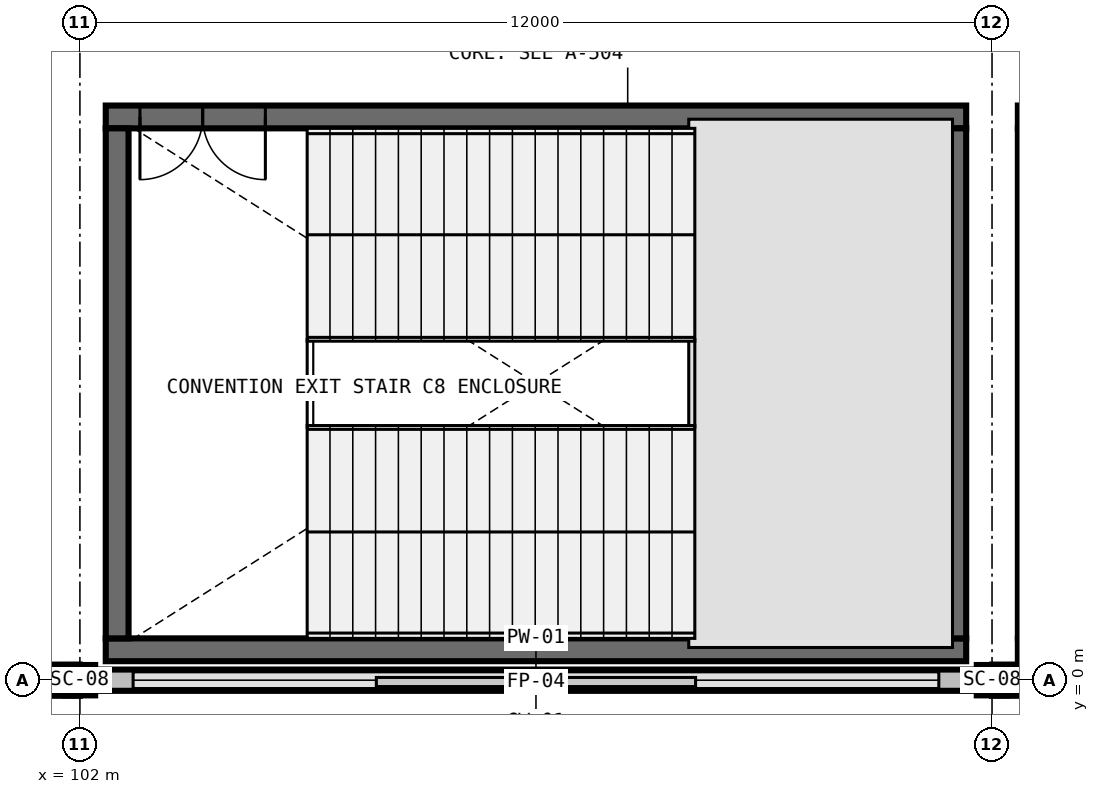
"""IFC4 building model, lengths in metres.
Left out: names, types, materials, properties, quantities, classifications, styles, units other than length and angle.
Written with IfcOpenShell. Run it as: python <this file> out.ifc"""

import sys

from ifc_helpers import new_model, si_unit, direction, frame, frame_2d, origin, origin_2d, place, context, subcontext, project, spatial, rectangle, i_section, extrude, element, fill, save


model = new_model("IFC4")
c1 = context("Model", 3, precision=1e-05, world=origin(), true_north=direction((0.0, 1.0)))
c2 = subcontext(c1, "Body", "Model", "MODEL_VIEW")
j1 = project(units=[si_unit("LENGTHUNIT", "METRE"), si_unit("PLANEANGLEUNIT", "RADIAN")], contexts=[c1])
p1 = place(None, origin())
s1 = spatial("IfcSite", under=j1, at=p1, CompositionType="ELEMENT")
p2 = place(p1, origin())
s2 = spatial("IfcBuilding", under=s1, at=p2, CompositionType="ELEMENT")
p3 = place(p2, frame((0.0, 0.0, 6.0)))
s3 = spatial("IfcBuildingStorey", under=s2, at=p3, CompositionType="ELEMENT", Elevation=6.0)
for number, where, z_axis, x_axis in (
    (1, (102.0, 0.0, 0.0), (0.0, 0.0, 1.0), (1.0, 0.0, 0.0)),
    (2, (114.0, 0.0, 0.0), (0.0, 0.0, 1.0), (1.0, 0.0, 0.0)),
):
    element("IfcColumn", number, at=place(p3, frame(where, z_axis=z_axis, x_axis=x_axis)), inside=s3, PredefinedType="COLUMN", context=c2, shape_type="SweptSolid", body=[
        extrude(i_section(OverallWidth=0.401, OverallDepth=0.399, WebThickness=0.025, FlangeThickness=0.04, FilletRadius=0.031, at=origin_2d()), origin(), (0.0, 0.0, 1.0), 6.0),
    ])
p4 = place(p3, frame((113.66, 0.4, 0.0), z_axis=(0.0, 0.0, 1.0), x_axis=(-1.0, 0.0, 0.0)))
e3 = element("IfcWall", 3, at=p4, inside=s3, PredefinedType="SHEAR", context=c2, shape_type="SweptSolid", body=[
    extrude(rectangle(XDim=11.32, YDim=0.3, at=frame_2d((5.66, 0.0))), origin(), (0.0, 0.0, 1.0), 6.0),
])
p5 = place(p3, frame((113.66, 7.41, 0.0), z_axis=(0.0, 0.0, 1.0), x_axis=(-1.0, 0.0, 0.0)))
e4 = element("IfcWall", 4, at=p5, inside=s3, PredefinedType="SHEAR", context=c2, shape_type="SweptSolid", body=[
    extrude(rectangle(XDim=11.32, YDim=0.3, at=frame_2d((5.66, 0.0))), origin(), (0.0, 0.0, 1.0), 6.0),
])
p6 = place(p5, frame((9.22, 0.0, 0.0)))
e5 = element("IfcOpeningElement", 5, at=p6, cuts=e4, PredefinedType="OPENING", context=c2, shape_type="SweptSolid", body=[
    extrude(rectangle(XDim=1.65, YDim=2.25, at=frame_2d((0.825, 1.125))), frame((0.0, 0.165, 0.0), z_axis=(0.0, -1.0, 0.0), x_axis=(1.0, 0.0, 0.0)), (0.0, 0.0, 1.0), 0.33),
])
for number, where, z_axis, x_axis in (
    (6, (102.49, 7.26, 0.0), (0.0, 0.0, 1.0), (0.0, -1.0, 0.0)),
    (7, (113.51, 0.55, 0.0), (0.0, 0.0, 1.0), (0.0, 1.0, 0.0)),
):
    element("IfcWall", number, at=place(p3, frame(where, z_axis=z_axis, x_axis=x_axis)), inside=s3, PredefinedType="SHEAR", context=c2, shape_type="SweptSolid", body=[
        extrude(rectangle(XDim=6.71, YDim=0.3, at=frame_2d((3.355, 0.0))), origin(), (0.0, 0.0, 1.0), 6.0),
    ])
p7 = place(p3, frame((125.66, 0.4, 0.0), z_axis=(0.0, 0.0, 1.0), x_axis=(-1.0, 0.0, 0.0)))
e8 = element("IfcWall", 8, at=p7, inside=s3, PredefinedType="SHEAR", context=c2, shape_type="SweptSolid", body=[
    extrude(rectangle(XDim=11.32, YDim=0.3, at=frame_2d((5.66, 0.0))), origin(), (0.0, 0.0, 1.0), 6.0),
])
p8 = place(p3, frame((125.66, 7.41, 0.0), z_axis=(0.0, 0.0, 1.0), x_axis=(-1.0, 0.0, 0.0)))
e9 = element("IfcWall", 9, at=p8, inside=s3, PredefinedType="SHEAR", context=c2, shape_type="SweptSolid", body=[
    extrude(rectangle(XDim=11.32, YDim=0.3, at=frame_2d((5.66, 0.0))), origin(), (0.0, 0.0, 1.0), 6.0),
])
p9 = place(p8, frame((9.22, 0.0, 0.0)))
e10 = element("IfcOpeningElement", 10, at=p9, cuts=e9, PredefinedType="OPENING", context=c2, shape_type="SweptSolid", body=[
    extrude(rectangle(XDim=1.65, YDim=2.25, at=frame_2d((0.825, 1.125))), frame((0.0, 0.165, 0.0), z_axis=(0.0, -1.0, 0.0), x_axis=(1.0, 0.0, 0.0)), (0.0, 0.0, 1.0), 0.33),
])
p10 = place(p3, frame((114.49, 7.26, 0.0), z_axis=(0.0, 0.0, 1.0), x_axis=(0.0, -1.0, 0.0)))
e11 = element("IfcWall", 11, at=p10, inside=s3, PredefinedType="SHEAR", context=c2, shape_type="SweptSolid", body=[
    extrude(rectangle(XDim=6.71, YDim=0.3, at=frame_2d((3.355, 0.0))), origin(), (0.0, 0.0, 1.0), 6.0),
])
p11 = place(p3, frame((96.0, 0.0, 0.0), z_axis=(0.0, 0.0, 1.0), x_axis=(1.0, 0.0, 0.0)))
e12 = element("IfcWall", 12, at=p11, inside=s3, PredefinedType="STANDARD", context=c2, shape_type="SweptSolid", body=[
    extrude(rectangle(XDim=6.0, YDim=0.41, at=frame_2d((3.0, 0.0))), origin(), (0.0, 0.0, 1.0), 4.676),
])
p12 = place(p3, frame((102.0, 0.0, 0.0), z_axis=(0.0, 0.0, 1.0), x_axis=(1.0, 0.0, 0.0)))
e13 = element("IfcWall", 13, at=p12, inside=s3, PredefinedType="PARAPET", context=c2, shape_type="SweptSolid", body=[
    extrude(rectangle(XDim=12.0, YDim=0.28, at=frame_2d((6.0, 0.0))), origin(), (0.0, 0.0, 1.0), 0.2),
])
p13 = place(p3, frame((114.0, 0.0, 0.0), z_axis=(0.0, 0.0, 1.0), x_axis=(1.0, 0.0, 0.0)))
e14 = element("IfcWall", 14, at=p13, inside=s3, PredefinedType="STANDARD", context=c2, shape_type="SweptSolid", body=[
    extrude(rectangle(XDim=12.0, YDim=0.41, at=frame_2d((6.0, 0.0))), origin(), (0.0, 0.0, 1.0), 4.676),
])
p14 = place(p13, frame((1.5, 0.0, 0.85)))
e15 = element("IfcOpeningElement", 15, at=p14, cuts=e14, PredefinedType="OPENING", context=c2, shape_type="SweptSolid", body=[
    extrude(rectangle(XDim=2.2, YDim=1.95, at=frame_2d((1.1, 0.975))), frame((0.0, 0.22, 0.0), z_axis=(0.0, -1.0, 0.0), x_axis=(1.0, 0.0, 0.0)), (0.0, 0.0, 1.0), 0.44),
])
p15 = place(p6, origin())
e16 = element("IfcDoor", 16, at=p15, inside=s3, OperationType="DOUBLE_DOOR_SINGLE_SWING", PredefinedType="DOOR", context=c2, shape_type="SweptSolid", body=[
    extrude(rectangle(XDim=1.65, YDim=2.25, at=frame_2d((0.825, 1.125))), frame((0.0, 0.025, 0.0), z_axis=(0.0, -1.0, 0.0), x_axis=(1.0, 0.0, 0.0)), (0.0, 0.0, 1.0), 0.05),
])
fill(e5, e16)
save(model, sys.argv[1])
